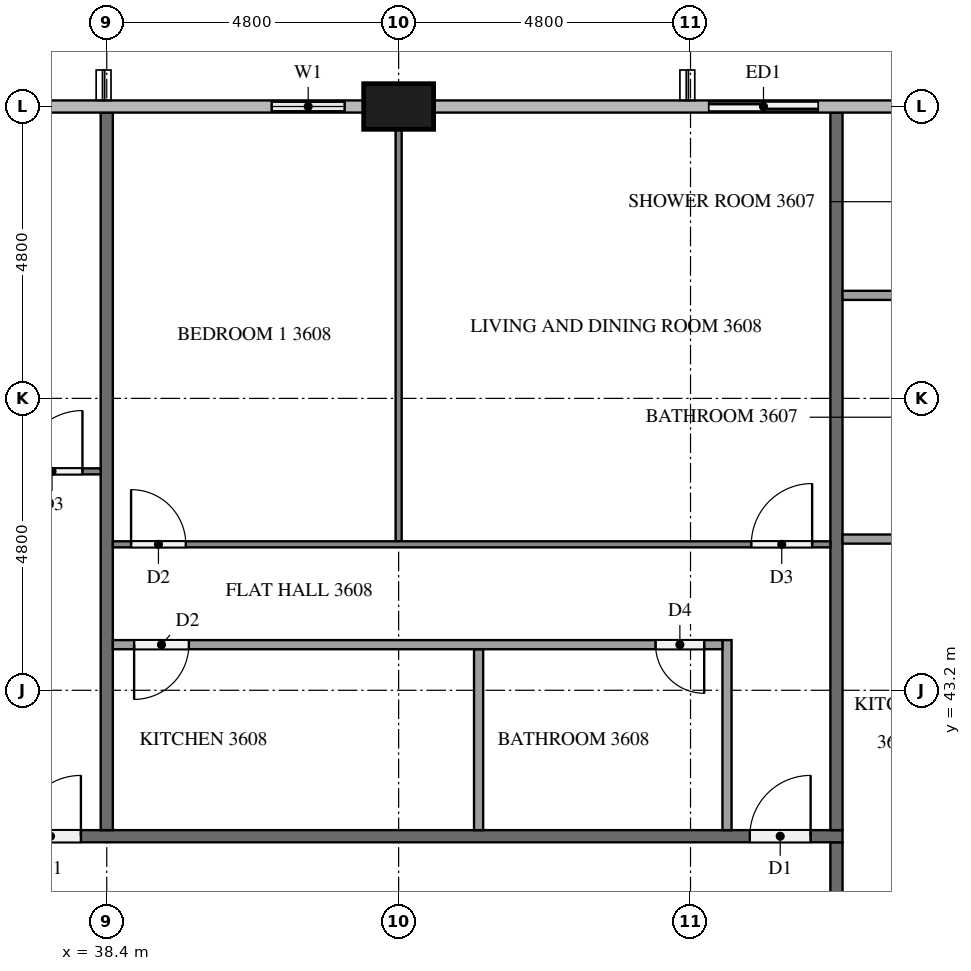
"""IFC4 building model, lengths in metres.
Left out: names, types, materials, properties, quantities, classifications, styles, units other than length and angle.
Written with IfcOpenShell. Run it as: python <this file> out.ifc"""

import sys

from ifc_helpers import new_model, si_unit, direction, frame, frame_2d, origin, origin_2d, place, context, subcontext, project, spatial, rectangle, extrude, element, fill, save


model = new_model("IFC4")
c1 = context("Model", 3, precision=1e-05, world=origin(), true_north=direction((0.0, 1.0)))
c2 = subcontext(c1, "Body", "Model", "MODEL_VIEW")
j1 = project(units=[si_unit("LENGTHUNIT", "METRE"), si_unit("PLANEANGLEUNIT", "RADIAN")], contexts=[c1])
p1 = place(None, origin())
s1 = spatial("IfcSite", under=j1, at=p1, CompositionType="ELEMENT")
p2 = place(p1, origin())
s2 = spatial("IfcBuilding", under=s1, at=p2, CompositionType="ELEMENT")
p3 = place(p2, frame((0.0, 0.0, 140.1)))
s3 = spatial("IfcBuildingStorey", under=s2, at=p3, CompositionType="ELEMENT", Elevation=140.1)
p4 = place(p3, frame((43.2, 52.8, 0.0), z_axis=(0.0, 0.0, 1.0), x_axis=(1.0, 0.0, 0.0)))
e1 = element("IfcColumn", 1, at=p4, inside=s3, PredefinedType="COLUMN", context=c2, shape_type="SweptSolid", body=[
    extrude(rectangle(XDim=1.15, YDim=0.75, at=origin_2d()), origin(), (0.0, 0.0, 1.0), 3.1),
])
p5 = place(p3, frame((50.4, 52.8, 0.0), z_axis=(0.0, 0.0, 1.0), x_axis=(-1.0, 0.0, 0.0)))
e2 = element("IfcWall", 2, at=p5, inside=s3, PredefinedType="SOLIDWALL", context=c2, shape_type="SweptSolid", body=[
    extrude(rectangle(XDim=2.4, YDim=0.15, at=frame_2d((1.2, 0.0))), origin(), (0.0, 0.0, 1.0), 3.1),
])
p6 = place(p5, frame((0.3, 0.0, 0.0)))
e3 = element("IfcOpeningElement", 3, at=p6, cuts=e2, PredefinedType="OPENING", context=c2, shape_type="SweptSolid", body=[
    extrude(rectangle(XDim=1.8, YDim=2.4, at=frame_2d((0.9, 1.2))), frame((0.0, 0.085, 0.0), z_axis=(0.0, -1.0, 0.0), x_axis=(1.0, 0.0, 0.0)), (0.0, 0.0, 1.0), 0.17),
])
p7 = place(p3, frame((42.625, 52.8, 0.0), z_axis=(0.0, 0.0, 1.0), x_axis=(-1.0, 0.0, 0.0)))
e4 = element("IfcWall", 4, at=p7, inside=s3, PredefinedType="SOLIDWALL", context=c2, shape_type="SweptSolid", body=[
    extrude(rectangle(XDim=1.825, YDim=0.15, at=frame_2d((0.913, 0.0))), origin(), (0.0, 0.0, 1.0), 3.1),
])
p8 = place(p7, frame((0.312, 0.0, 0.9)))
e5 = element("IfcOpeningElement", 5, at=p8, cuts=e4, PredefinedType="OPENING", context=c2, shape_type="SweptSolid", body=[
    extrude(rectangle(XDim=1.2, YDim=1.4, at=frame_2d((0.6, 0.7))), frame((0.0, 0.085, 0.0), z_axis=(0.0, -1.0, 0.0), x_axis=(1.0, 0.0, 0.0)), (0.0, 0.0, 1.0), 0.17),
])
p9 = place(p3, frame((50.4, 40.7, 0.0), z_axis=(0.0, 0.0, 1.0), x_axis=(0.0, -1.0, 0.0)))
e6 = element("IfcWall", 6, at=p9, inside=s3, PredefinedType="PARTITIONING", context=c2, shape_type="SweptSolid", body=[
    extrude(rectangle(XDim=2.8, YDim=0.2, at=frame_2d((1.4, 0.0))), origin(), (0.0, 0.0, 1.0), 3.1),
])
p10 = place(p9, frame((1.475, 0.0, 0.0)))
e7 = element("IfcOpeningElement", 7, at=p10, cuts=e6, PredefinedType="OPENING", context=c2, shape_type="SweptSolid", body=[
    extrude(rectangle(XDim=1.0, YDim=2.1, at=frame_2d((0.5, 1.05))), frame((0.0, 0.11, 0.0), z_axis=(0.0, -1.0, 0.0), x_axis=(1.0, 0.0, 0.0)), (0.0, 0.0, 1.0), 0.22),
])
p11 = place(p3, frame((11.9, 40.8, 0.0), z_axis=(0.0, 0.0, 1.0), x_axis=(1.0, 0.0, 0.0)))
e8 = element("IfcWall", 8, at=p11, inside=s3, PredefinedType="PARTITIONING", context=c2, shape_type="SweptSolid", body=[
    extrude(rectangle(XDim=38.6, YDim=0.2, at=frame_2d((19.3, 0.0))), origin(), (0.0, 0.0, 1.0), 3.1),
])
p12 = place(p11, frame((37.075, 0.0, 0.0)))
e9 = element("IfcOpeningElement", 9, at=p12, cuts=e8, PredefinedType="OPENING", context=c2, shape_type="SweptSolid", body=[
    extrude(rectangle(XDim=1.0, YDim=2.1, at=frame_2d((0.5, 1.05))), frame((0.0, 0.11, 0.0), z_axis=(0.0, -1.0, 0.0), x_axis=(1.0, 0.0, 0.0)), (0.0, 0.0, 1.0), 0.22),
])
p13 = place(p11, frame((25.075, 0.0, 0.0)))
e10 = element("IfcOpeningElement", 10, at=p13, cuts=e8, PredefinedType="OPENING", context=c2, shape_type="SweptSolid", body=[
    extrude(rectangle(XDim=1.0, YDim=2.1, at=frame_2d((0.5, 1.05))), frame((0.0, 0.11, 0.0), z_axis=(0.0, -1.0, 0.0), x_axis=(1.0, 0.0, 0.0)), (0.0, 0.0, 1.0), 0.22),
])
p14 = place(p11, frame((0.475, 0.0, 0.0)))
e11 = element("IfcOpeningElement", 11, at=p14, cuts=e8, PredefinedType="OPENING", context=c2, shape_type="SweptSolid", body=[
    extrude(rectangle(XDim=1.1, YDim=2.1, at=frame_2d((0.55, 1.05))), frame((0.0, 0.11, 0.0), z_axis=(0.0, -1.0, 0.0), x_axis=(1.0, 0.0, 0.0)), (0.0, 0.0, 1.0), 0.22),
])
for number, where, z_axis, x_axis in (
    (12, (50.4, 40.9, 0.0), (0.0, 0.0, 1.0), (0.0, 1.0, 0.0)),
    (13, (38.4, 52.7, 0.0), (0.0, 0.0, 1.0), (0.0, -1.0, 0.0)),
):
    element("IfcWall", number, at=place(p3, frame(where, z_axis=z_axis, x_axis=x_axis)), inside=s3, PredefinedType="PARTITIONING", context=c2, shape_type="SweptSolid", body=[
        extrude(rectangle(XDim=11.8, YDim=0.2, at=frame_2d((5.9, 0.0))), origin(), (0.0, 0.0, 1.0), 3.1),
    ])
for number, where, z_axis, x_axis in (
    (14, (50.5, 45.687, 0.0), (0.0, 0.0, 1.0), (1.0, 0.0, 0.0)),
    (15, (50.5, 49.694, 0.0), (0.0, 0.0, 1.0), (1.0, 0.0, 0.0)),
):
    element("IfcWall", number, at=place(p3, frame(where, z_axis=z_axis, x_axis=x_axis)), inside=s3, PredefinedType="PARTITIONING", context=c2, shape_type="SweptSolid", body=[
        extrude(rectangle(XDim=1.775, YDim=0.15, at=frame_2d((0.887, 0.0))), origin(), (0.0, 0.0, 1.0), 3.1),
    ])
p15 = place(p3, frame((43.2, 45.65, 0.0), z_axis=(0.0, 0.0, 1.0), x_axis=(0.0, 1.0, 0.0)))
e16 = element("IfcWall", 16, at=p15, inside=s3, PredefinedType="PARTITIONING", context=c2, shape_type="SweptSolid", body=[
    extrude(rectangle(XDim=6.775, YDim=0.1, at=frame_2d((3.388, 0.0))), origin(), (0.0, 0.0, 1.0), 3.1),
])
p16 = place(p3, frame((38.5, 45.6, 0.0), z_axis=(0.0, 0.0, 1.0), x_axis=(1.0, 0.0, 0.0)))
e17 = element("IfcWall", 17, at=p16, inside=s3, PredefinedType="PARTITIONING", context=c2, shape_type="SweptSolid", body=[
    extrude(rectangle(XDim=11.8, YDim=0.1, at=frame_2d((5.9, 0.0))), origin(), (0.0, 0.0, 1.0), 3.1),
])
p17 = place(p16, frame((10.5, 0.0, 0.0)))
e18 = element("IfcOpeningElement", 18, at=p17, cuts=e17, PredefinedType="OPENING", context=c2, shape_type="SweptSolid", body=[
    extrude(rectangle(XDim=1.0, YDim=2.1, at=frame_2d((0.5, 1.05))), frame((0.0, 0.06, 0.0), z_axis=(0.0, -1.0, 0.0), x_axis=(1.0, 0.0, 0.0)), (0.0, 0.0, 1.0), 0.12),
])
p18 = place(p16, frame((0.3, 0.0, 0.0)))
e19 = element("IfcOpeningElement", 19, at=p18, cuts=e17, PredefinedType="OPENING", context=c2, shape_type="SweptSolid", body=[
    extrude(rectangle(XDim=0.9, YDim=2.1, at=frame_2d((0.45, 1.05))), frame((0.0, 0.06, 0.0), z_axis=(0.0, -1.0, 0.0), x_axis=(1.0, 0.0, 0.0)), (0.0, 0.0, 1.0), 0.12),
])
p19 = place(p3, frame((44.515, 40.9, 0.0), z_axis=(0.0, 0.0, 1.0), x_axis=(0.0, 1.0, 0.0)))
e20 = element("IfcWall", 20, at=p19, inside=s3, PredefinedType="PARTITIONING", context=c2, shape_type="SweptSolid", body=[
    extrude(rectangle(XDim=2.975, YDim=0.15, at=frame_2d((1.488, 0.0))), origin(), (0.0, 0.0, 1.0), 3.1),
])
p20 = place(p3, frame((48.6, 40.9, 0.0), z_axis=(0.0, 0.0, 1.0), x_axis=(0.0, 1.0, 0.0)))
e21 = element("IfcWall", 21, at=p20, inside=s3, PredefinedType="PARTITIONING", context=c2, shape_type="SweptSolid", body=[
    extrude(rectangle(XDim=3.125, YDim=0.15, at=frame_2d((1.562, 0.0))), origin(), (0.0, 0.0, 1.0), 3.1),
])
p21 = place(p3, frame((48.525, 43.95, 0.0), z_axis=(0.0, 0.0, 1.0), x_axis=(-1.0, 0.0, 0.0)))
e22 = element("IfcWall", 22, at=p21, inside=s3, PredefinedType="PARTITIONING", context=c2, shape_type="SweptSolid", body=[
    extrude(rectangle(XDim=10.025, YDim=0.15, at=frame_2d((5.012, 0.0))), origin(), (0.0, 0.0, 1.0), 3.1),
])
p22 = place(p21, frame((0.3, 0.0, 0.0)))
e23 = element("IfcOpeningElement", 23, at=p22, cuts=e22, PredefinedType="OPENING", context=c2, shape_type="SweptSolid", body=[
    extrude(rectangle(XDim=0.8, YDim=2.1, at=frame_2d((0.4, 1.05))), frame((0.0, 0.085, 0.0), z_axis=(0.0, -1.0, 0.0), x_axis=(1.0, 0.0, 0.0)), (0.0, 0.0, 1.0), 0.17),
])
p23 = place(p21, frame((8.775, 0.0, 0.0)))
e24 = element("IfcOpeningElement", 24, at=p23, cuts=e22, PredefinedType="OPENING", context=c2, shape_type="SweptSolid", body=[
    extrude(rectangle(XDim=0.9, YDim=2.1, at=frame_2d((0.45, 1.05))), frame((0.0, 0.085, 0.0), z_axis=(0.0, -1.0, 0.0), x_axis=(1.0, 0.0, 0.0)), (0.0, 0.0, 1.0), 0.17),
])
p24 = place(p3, frame((31.3, 46.8, 0.0), z_axis=(0.0, 0.0, 1.0), x_axis=(1.0, 0.0, 0.0)))
e25 = element("IfcWall", 25, at=p24, inside=s3, PredefinedType="PARTITIONING", context=c2, shape_type="SweptSolid", body=[
    extrude(rectangle(XDim=7.0, YDim=0.1, at=frame_2d((3.5, 0.0))), origin(), (0.0, 0.0, 1.0), 3.1),
])
p25 = place(p24, frame((5.7, 0.0, 0.0)))
e26 = element("IfcOpeningElement", 26, at=p25, cuts=e25, PredefinedType="OPENING", context=c2, shape_type="SweptSolid", body=[
    extrude(rectangle(XDim=1.0, YDim=2.1, at=frame_2d((0.5, 1.05))), frame((0.0, 0.06, 0.0), z_axis=(0.0, -1.0, 0.0), x_axis=(1.0, 0.0, 0.0)), (0.0, 0.0, 1.0), 0.12),
])
p26 = place(p6, origin())
e27 = element("IfcDoor", 27, at=p26, inside=s3, OperationType="SLIDING_TO_RIGHT", PredefinedType="DOOR", context=c2, shape_type="SweptSolid", body=[
    extrude(rectangle(XDim=1.8, YDim=2.4, at=frame_2d((0.9, 1.2))), frame((0.0, 0.025, 0.0), z_axis=(0.0, -1.0, 0.0), x_axis=(1.0, 0.0, 0.0)), (0.0, 0.0, 1.0), 0.05),
])
fill(e3, e27)
p27 = place(p8, origin())
e28 = element("IfcWindow", 28, at=p27, inside=s3, PartitioningType="SINGLE_PANEL", PredefinedType="WINDOW", context=c2, shape_type="SweptSolid", body=[
    extrude(rectangle(XDim=1.2, YDim=1.4, at=frame_2d((0.6, 0.7))), frame((0.0, 0.03, 0.0), z_axis=(0.0, -1.0, 0.0), x_axis=(1.0, 0.0, 0.0)), (0.0, 0.0, 1.0), 0.06),
])
fill(e5, e28)
p28 = place(p12, origin())
e29 = element("IfcDoor", 29, at=p28, inside=s3, OperationType="SINGLE_SWING_RIGHT", PredefinedType="DOOR", context=c2, shape_type="SweptSolid", body=[
    extrude(rectangle(XDim=1.0, YDim=2.1, at=frame_2d((0.5, 1.05))), frame((0.0, 0.025, 0.0), z_axis=(0.0, -1.0, 0.0), x_axis=(1.0, 0.0, 0.0)), (0.0, 0.0, 1.0), 0.05),
])
fill(e9, e29)
p29 = place(p13, origin())
e30 = element("IfcDoor", 30, at=p29, inside=s3, OperationType="SINGLE_SWING_RIGHT", PredefinedType="DOOR", context=c2, shape_type="SweptSolid", body=[
    extrude(rectangle(XDim=1.0, YDim=2.1, at=frame_2d((0.5, 1.05))), frame((0.0, 0.025, 0.0), z_axis=(0.0, -1.0, 0.0), x_axis=(1.0, 0.0, 0.0)), (0.0, 0.0, 1.0), 0.05),
])
fill(e10, e30)
p30 = place(p17, origin())
e31 = element("IfcDoor", 31, at=p30, inside=s3, OperationType="SINGLE_SWING_RIGHT", PredefinedType="DOOR", context=c2, shape_type="SweptSolid", body=[
    extrude(rectangle(XDim=1.0, YDim=2.1, at=frame_2d((0.5, 1.05))), frame((0.0, 0.025, 0.0), z_axis=(0.0, -1.0, 0.0), x_axis=(1.0, 0.0, 0.0)), (0.0, 0.0, 1.0), 0.05),
])
fill(e18, e31)
p31 = place(p18, origin())
e32 = element("IfcDoor", 32, at=p31, inside=s3, OperationType="SINGLE_SWING_LEFT", PredefinedType="DOOR", context=c2, shape_type="SweptSolid", body=[
    extrude(rectangle(XDim=0.9, YDim=2.1, at=frame_2d((0.45, 1.05))), frame((0.0, 0.025, 0.0), z_axis=(0.0, -1.0, 0.0), x_axis=(1.0, 0.0, 0.0)), (0.0, 0.0, 1.0), 0.05),
])
fill(e19, e32)
p32 = place(p22, origin())
e33 = element("IfcDoor", 33, at=p32, inside=s3, OperationType="SINGLE_SWING_LEFT", PredefinedType="DOOR", context=c2, shape_type="SweptSolid", body=[
    extrude(rectangle(XDim=0.8, YDim=2.1, at=frame_2d((0.4, 1.05))), frame((0.0, 0.025, 0.0), z_axis=(0.0, -1.0, 0.0), x_axis=(1.0, 0.0, 0.0)), (0.0, 0.0, 1.0), 0.05),
])
fill(e23, e33)
p33 = place(p23, origin())
e34 = element("IfcDoor", 34, at=p33, inside=s3, OperationType="SINGLE_SWING_RIGHT", PredefinedType="DOOR", context=c2, shape_type="SweptSolid", body=[
    extrude(rectangle(XDim=0.9, YDim=2.1, at=frame_2d((0.45, 1.05))), frame((0.0, 0.025, 0.0), z_axis=(0.0, -1.0, 0.0), x_axis=(1.0, 0.0, 0.0)), (0.0, 0.0, 1.0), 0.05),
])
fill(e24, e34)
p34 = place(p25, origin())
e35 = element("IfcDoor", 35, at=p34, inside=s3, OperationType="SINGLE_SWING_RIGHT", PredefinedType="DOOR", context=c2, shape_type="SweptSolid", body=[
    extrude(rectangle(XDim=1.0, YDim=2.1, at=frame_2d((0.5, 1.05))), frame((0.0, 0.025, 0.0), z_axis=(0.0, -1.0, 0.0), x_axis=(1.0, 0.0, 0.0)), (0.0, 0.0, 1.0), 0.05),
])
fill(e26, e35)
save(model, sys.argv[1])
